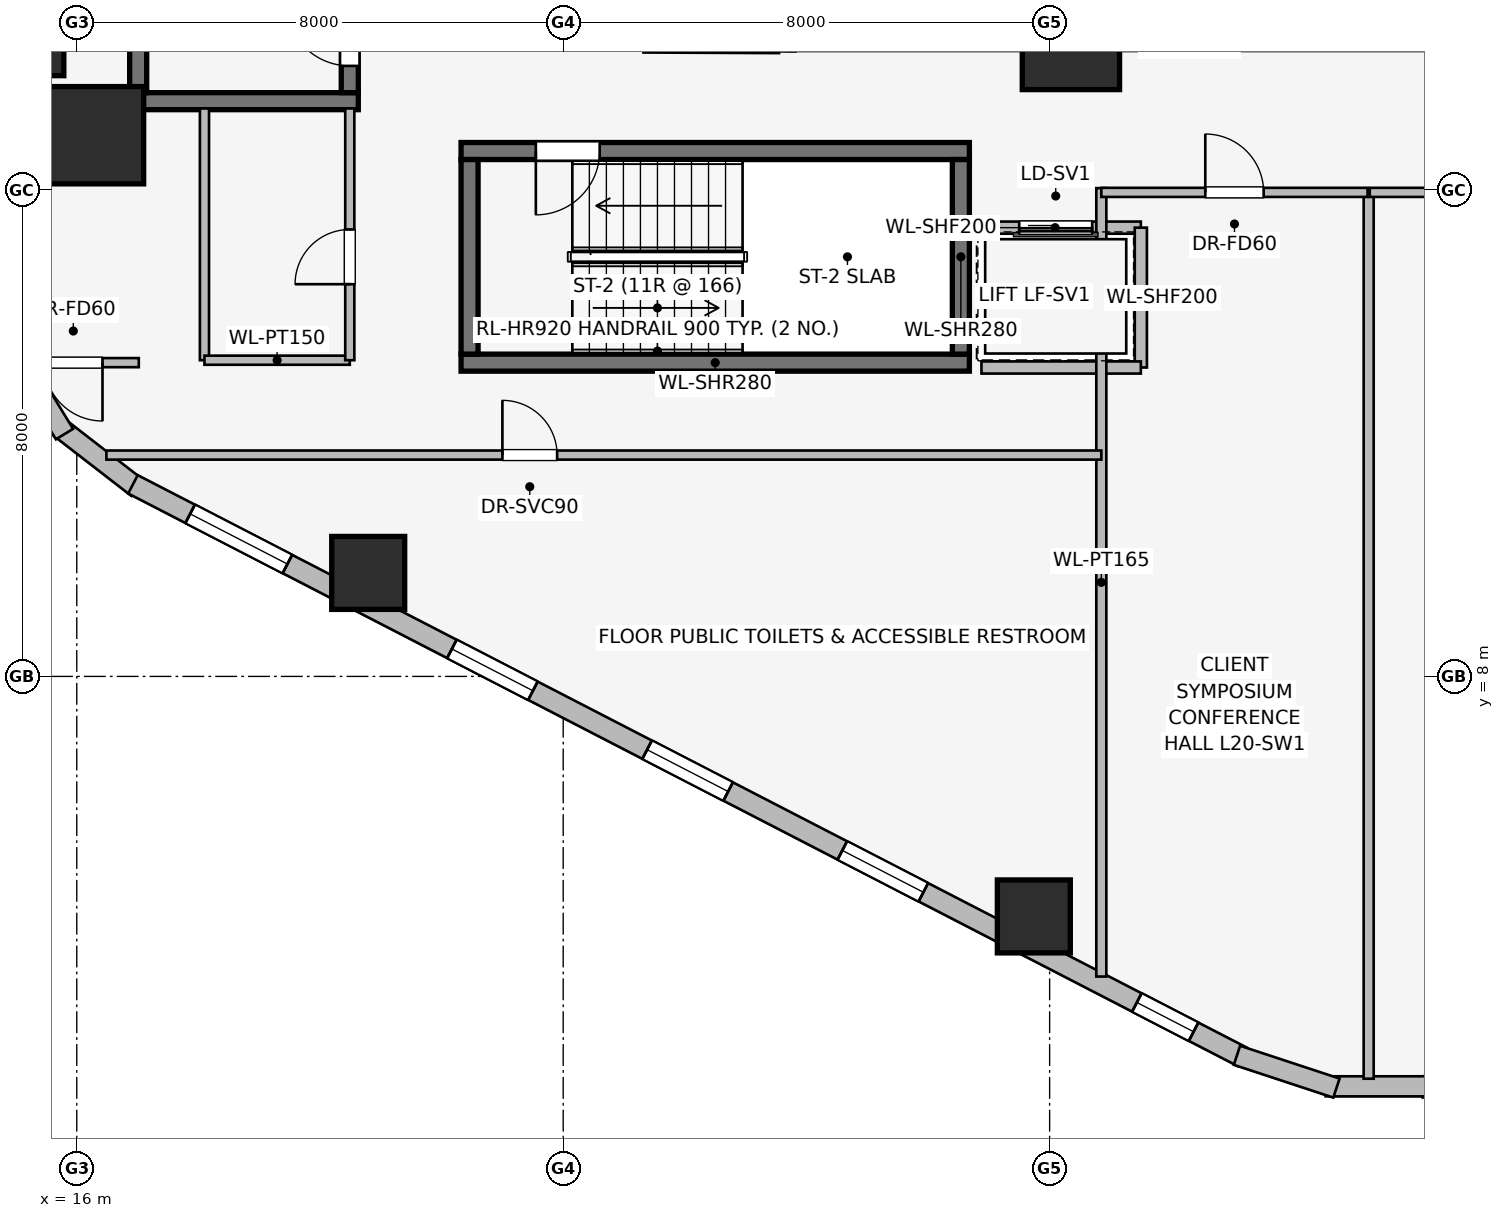
"""IFC4 building model, lengths in metres.
Left out: names, types, materials, properties, quantities, classifications, styles, units other than length and angle.
Written with IfcOpenShell. Run it as: python <this file> out.ifc"""

import sys

from ifc_helpers import new_model, si_unit, direction, frame, frame_2d, origin, origin_2d, place, context, subcontext, project, spatial, rectangle, extrude, element, fill, save


model = new_model("IFC4")
c1 = context("Model", 3, precision=1e-05, world=origin(), true_north=direction((0.0, 1.0)))
c2 = subcontext(c1, "Body", "Model", "MODEL_VIEW")
j1 = project(units=[si_unit("LENGTHUNIT", "METRE"), si_unit("PLANEANGLEUNIT", "RADIAN")], contexts=[c1])
p1 = place(None, origin())
s1 = spatial("IfcSite", under=j1, at=p1, CompositionType="ELEMENT")
p2 = place(p1, origin())
s2 = spatial("IfcBuilding", under=s1, at=p2, CompositionType="ELEMENT")
p3 = place(p2, frame((0.0, 0.0, 78.1)))
s3 = spatial("IfcBuildingStorey", under=s2, at=p3, CompositionType="ELEMENT", Elevation=78.1)
p4 = place(p3, frame((16.87, 17.46, 0.0), z_axis=(0.0, 0.0, 1.0), x_axis=(1.0, 0.0, 0.0)))
e1 = element("IfcWall", 1, at=p4, inside=s3, PredefinedType="SHEAR", context=c2, shape_type="SweptSolid", body=[
    extrude(rectangle(XDim=3.76, YDim=0.28, at=frame_2d((1.88, 0.0))), origin(), (0.0, 0.0, 1.0), 3.65),
])
p5 = place(p3, frame((17.01, 25.4, 0.0), z_axis=(0.0, 0.0, 1.0), x_axis=(0.0, -1.0, 0.0)))
e2 = element("IfcWall", 2, at=p5, inside=s3, PredefinedType="SHEAR", context=c2, shape_type="SweptSolid", body=[
    extrude(rectangle(XDim=7.8, YDim=0.28, at=frame_2d((3.9, 0.0))), origin(), (0.0, 0.0, 1.0), 3.65),
])
p6 = place(p3, frame((20.49, 17.6, 0.0), z_axis=(0.0, 0.0, 1.0), x_axis=(0.0, 1.0, 0.0)))
e3 = element("IfcWall", 3, at=p6, inside=s3, PredefinedType="SHEAR", context=c2, shape_type="SweptSolid", body=[
    extrude(rectangle(XDim=7.8, YDim=0.28, at=frame_2d((3.9, 0.0))), origin(), (0.0, 0.0, 1.0), 3.65),
])
p7 = place(p6, frame((0.44, 0.0, 0.0)))
e4 = element("IfcOpeningElement", 4, at=p7, cuts=e3, PredefinedType="OPENING", context=c2, shape_type="SweptSolid", body=[
    extrude(rectangle(XDim=1.05, YDim=2.0, at=frame_2d((0.525, 1.0))), frame((0.0, 0.15, 0.0), z_axis=(0.0, -1.0, 0.0), x_axis=(1.0, 0.0, 0.0)), (0.0, 0.0, 1.0), 0.3),
])
p8 = place(p3, frame((22.32, 13.16, 0.0), z_axis=(0.0, 0.0, 1.0), x_axis=(1.0, 0.0, 0.0)))
e5 = element("IfcWall", 5, at=p8, inside=s3, PredefinedType="SHEAR", context=c2, shape_type="SweptSolid", body=[
    extrude(rectangle(XDim=8.36, YDim=0.28, at=frame_2d((4.18, 0.0))), origin(), (0.0, 0.0, 1.0), 3.65),
])
p9 = place(p3, frame((30.68, 16.64, 0.0), z_axis=(0.0, 0.0, 1.0), x_axis=(-1.0, 0.0, 0.0)))
e6 = element("IfcWall", 6, at=p9, inside=s3, PredefinedType="SHEAR", context=c2, shape_type="SweptSolid", body=[
    extrude(rectangle(XDim=8.36, YDim=0.28, at=frame_2d((4.18, 0.0))), origin(), (0.0, 0.0, 1.0), 3.65),
])
p10 = place(p9, frame((6.08, 0.0, 0.0)))
e7 = element("IfcOpeningElement", 7, at=p10, cuts=e6, PredefinedType="OPENING", context=c2, shape_type="SweptSolid", body=[
    extrude(rectangle(XDim=1.05, YDim=2.0, at=frame_2d((0.525, 1.0))), frame((0.0, 0.15, 0.0), z_axis=(0.0, -1.0, 0.0), x_axis=(1.0, 0.0, 0.0)), (0.0, 0.0, 1.0), 0.3),
])
for number, where, z_axis, x_axis in (
    (8, (22.46, 16.5, 0.0), (0.0, 0.0, 1.0), (0.0, -1.0, 0.0)),
    (9, (30.54, 13.3, 0.0), (0.0, 0.0, 1.0), (0.0, 1.0, 0.0)),
):
    element("IfcWall", number, at=place(p3, frame(where, z_axis=z_axis, x_axis=x_axis)), inside=s3, PredefinedType="SHEAR", context=c2, shape_type="SweptSolid", body=[
        extrude(rectangle(XDim=3.2, YDim=0.28, at=frame_2d((1.6, 0.0))), origin(), (0.0, 0.0, 1.0), 3.65),
    ])
for number, where, z_axis, x_axis in (
    (10, (16.3, 16.9, 0.0), (0.0, 0.0, 1.0), (1.0, 0.0, 0.0)),
    (11, (32.35, 18.45, 0.0), (0.0, 0.0, 1.0), (1.0, 0.0, 0.0)),
):
    element("IfcColumn", number, at=place(p3, frame(where, z_axis=z_axis, x_axis=x_axis)), inside=s3, PredefinedType="COLUMN", context=c2, shape_type="SweptSolid", body=[
        extrude(rectangle(XDim=1.6, YDim=1.6, at=origin_2d()), origin(), (0.0, 0.0, 1.0), 3.65),
    ])
for number, where, z_axis, x_axis in (
    (12, (15.187, 18.479, 0.0), (0.0, 0.0, 1.0), (1.0, 0.0, 0.0)),
    (13, (20.793, 9.702, 0.0), (0.0, 0.0, 1.0), (1.0, 0.0, 0.0)),
    (14, (31.74, 4.053, 0.0), (0.0, 0.0, 1.0), (1.0, 0.0, 0.0)),
):
    element("IfcColumn", number, at=place(p3, frame(where, z_axis=z_axis, x_axis=x_axis)), inside=s3, PredefinedType="COLUMN", context=c2, shape_type="SweptSolid", body=[
        extrude(rectangle(XDim=1.2, YDim=1.2, at=origin_2d()), origin(), (0.0, 0.0, 1.0), 3.65),
    ])
p11 = place(p3, frame((16.998, 11.099, 0.0), z_axis=(0.0, 0.0, 1.0), x_axis=(-0.790691856293, 0.61221433207, 0.0)))
e15 = element("IfcWall", 15, at=p11, inside=s3, PredefinedType="STANDARD", context=c2, shape_type="SweptSolid", body=[
    extrude(rectangle(XDim=1.676, YDim=0.33, at=frame_2d((0.838, 0.0))), origin(), (0.0, 0.0, 1.0), 3.39),
])
p12 = place(p3, frame((15.798, 11.985, 0.0), z_axis=(0.0, 0.0, 1.0), x_axis=(-0.520584129191, 0.853810379671, 0.0)))
e16 = element("IfcWall", 16, at=p12, inside=s3, PredefinedType="STANDARD", context=c2, shape_type="SweptSolid", body=[
    extrude(rectangle(XDim=1.677, YDim=0.33, at=frame_2d((0.838, 0.0))), origin(), (0.0, 0.0, 1.0), 3.39),
])
p13 = place(p3, frame((35.169, 1.743, 0.0), z_axis=(0.0, 0.0, 1.0), x_axis=(-0.888634413993, 0.458616264721, 0.0)))
e17 = element("IfcWall", 17, at=p13, inside=s3, PredefinedType="STANDARD", context=c2, shape_type="SweptSolid", body=[
    extrude(rectangle(XDim=20.531, YDim=0.34, at=frame_2d((10.266, 0.0))), origin(), (0.0, 0.0, 1.0), 2.684),
])
p14 = place(p13, frame((0.902, 0.0, 0.75)))
e18 = element("IfcOpeningElement", 18, at=p14, cuts=e17, PredefinedType="OPENING", context=c2, shape_type="SweptSolid", body=[
    extrude(rectangle(XDim=1.05, YDim=1.4, at=frame_2d((0.525, 0.7))), frame((0.0, 0.18, 0.0), z_axis=(0.0, -1.0, 0.0), x_axis=(1.0, 0.0, 0.0)), (0.0, 0.0, 1.0), 0.36),
])
p15 = place(p13, frame((5.903, 0.0, 0.75)))
e19 = element("IfcOpeningElement", 19, at=p15, cuts=e17, PredefinedType="OPENING", context=c2, shape_type="SweptSolid", body=[
    extrude(rectangle(XDim=1.5, YDim=1.5, at=frame_2d((0.75, 0.75))), frame((0.0, 0.18, 0.0), z_axis=(0.0, -1.0, 0.0), x_axis=(1.0, 0.0, 0.0)), (0.0, 0.0, 1.0), 0.36),
])
p16 = place(p13, frame((9.516, 0.0, 0.75)))
e20 = element("IfcOpeningElement", 20, at=p16, cuts=e17, PredefinedType="OPENING", context=c2, shape_type="SweptSolid", body=[
    extrude(rectangle(XDim=1.5, YDim=1.5, at=frame_2d((0.75, 0.75))), frame((0.0, 0.18, 0.0), z_axis=(0.0, -1.0, 0.0), x_axis=(1.0, 0.0, 0.0)), (0.0, 0.0, 1.0), 0.36),
])
p17 = place(p13, frame((13.129, 0.0, 0.75)))
e21 = element("IfcOpeningElement", 21, at=p17, cuts=e17, PredefinedType="OPENING", context=c2, shape_type="SweptSolid", body=[
    extrude(rectangle(XDim=1.5, YDim=1.5, at=frame_2d((0.75, 0.75))), frame((0.0, 0.18, 0.0), z_axis=(0.0, -1.0, 0.0), x_axis=(1.0, 0.0, 0.0)), (0.0, 0.0, 1.0), 0.36),
])
p18 = place(p13, frame((17.673, 0.0, 0.75)))
e22 = element("IfcOpeningElement", 22, at=p18, cuts=e17, PredefinedType="OPENING", context=c2, shape_type="SweptSolid", body=[
    extrude(rectangle(XDim=1.8, YDim=1.5, at=frame_2d((0.9, 0.75))), frame((0.0, 0.18, 0.0), z_axis=(0.0, -1.0, 0.0), x_axis=(1.0, 0.0, 0.0)), (0.0, 0.0, 1.0), 0.36),
])
p19 = place(p3, frame((39.719, 1.769, 0.0), z_axis=(0.0, 0.0, 1.0), x_axis=(-0.94976901097, -0.312951794691, 0.0)))
e23 = element("IfcWall", 23, at=p19, inside=s3, PredefinedType="STANDARD", context=c2, shape_type="SweptSolid", body=[
    extrude(rectangle(XDim=1.722, YDim=0.33, at=frame_2d((0.861, 0.0))), origin(), (0.0, 0.0, 1.0), 3.39),
])
p20 = place(p3, frame((38.261, 1.259, 0.0), z_axis=(0.0, 0.0, 1.0), x_axis=(-1.0, 0.0, 0.0)))
e24 = element("IfcWall", 24, at=p20, inside=s3, PredefinedType="STANDARD", context=c2, shape_type="SweptSolid", body=[
    extrude(rectangle(XDim=1.722, YDim=0.33, at=frame_2d((0.861, 0.0))), origin(), (0.0, 0.0, 1.0), 3.39),
])
p21 = place(p3, frame((36.717, 1.23, 0.0), z_axis=(0.0, 0.0, 1.0), x_axis=(-0.94976901097, 0.312951794691, 0.0)))
e25 = element("IfcWall", 25, at=p21, inside=s3, PredefinedType="STANDARD", context=c2, shape_type="SweptSolid", body=[
    extrude(rectangle(XDim=1.722, YDim=0.33, at=frame_2d((0.861, 0.0))), origin(), (0.0, 0.0, 1.0), 3.39),
])
p22 = place(p3, frame((33.5, 15.38, 0.0), z_axis=(0.0, 0.0, 1.0), x_axis=(-1.0, 0.0, 0.0)))
e26 = element("IfcWall", 26, at=p22, inside=s3, PredefinedType="PARTITIONING", context=c2, shape_type="SweptSolid", body=[
    extrude(rectangle(XDim=2.82, YDim=0.2, at=frame_2d((1.41, 0.0))), origin(), (0.0, 0.0, 1.0), 3.39),
])
p23 = place(p22, frame((0.8, 0.0, 0.0)))
e27 = element("IfcOpeningElement", 27, at=p23, cuts=e26, PredefinedType="OPENING", context=c2, shape_type="SweptSolid", body=[
    extrude(rectangle(XDim=1.2, YDim=2.2, at=frame_2d((0.6, 1.1))), frame((0.0, 0.11, 0.0), z_axis=(0.0, -1.0, 0.0), x_axis=(1.0, 0.0, 0.0)), (0.0, 0.0, 1.0), 0.22),
])
p24 = place(p3, frame((33.5, 13.08, 0.0), z_axis=(0.0, 0.0, 1.0), x_axis=(0.0, 1.0, 0.0)))
e28 = element("IfcWall", 28, at=p24, inside=s3, PredefinedType="PARTITIONING", context=c2, shape_type="SweptSolid", body=[
    extrude(rectangle(XDim=2.3, YDim=0.2, at=frame_2d((1.15, 0.0))), origin(), (0.0, 0.0, 1.0), 3.39),
])
p25 = place(p3, frame((30.879, 13.08, 0.0), z_axis=(0.0, 0.0, 1.0), x_axis=(1.0, 0.0, 0.0)))
e29 = element("IfcWall", 29, at=p25, inside=s3, PredefinedType="PARTITIONING", context=c2, shape_type="SweptSolid", body=[
    extrude(rectangle(XDim=2.621, YDim=0.2, at=frame_2d((1.311, 0.0))), origin(), (0.0, 0.0, 1.0), 3.39),
])
p26 = place(p3, frame((25.32, 18.36, 0.0), z_axis=(0.0, 0.0, 1.0), x_axis=(0.999989925833, -0.004488678231, 0.0)))
e30 = element("IfcWall", 30, at=p26, inside=s3, PredefinedType="PARTITIONING", context=c2, shape_type="SweptSolid", body=[
    extrude(rectangle(XDim=2.23, YDim=0.2, at=frame_2d((1.115, 0.0))), origin(), (0.0, 0.0, 1.0), 3.39),
])
p27 = place(p3, frame((18.1, 17.34, 0.0), z_axis=(0.0, 0.0, 1.0), x_axis=(0.0, -1.0, 0.0)))
e31 = element("IfcWall", 31, at=p27, inside=s3, PredefinedType="PARTITIONING", context=c2, shape_type="SweptSolid", body=[
    extrude(rectangle(XDim=4.14, YDim=0.15, at=frame_2d((2.07, 0.0))), origin(), (0.0, 0.0, 1.0), 3.39),
])
p28 = place(p3, frame((18.1, 13.2, 0.0), z_axis=(0.0, 0.0, 1.0), x_axis=(1.0, 0.0, 0.0)))
e32 = element("IfcWall", 32, at=p28, inside=s3, PredefinedType="PARTITIONING", context=c2, shape_type="SweptSolid", body=[
    extrude(rectangle(XDim=2.39, YDim=0.15, at=frame_2d((1.195, 0.0))), origin(), (0.0, 0.0, 1.0), 3.39),
])
p29 = place(p3, frame((20.49, 13.2, 0.0), z_axis=(0.0, 0.0, 1.0), x_axis=(0.0, 1.0, 0.0)))
e33 = element("IfcWall", 33, at=p29, inside=s3, PredefinedType="PARTITIONING", context=c2, shape_type="SweptSolid", body=[
    extrude(rectangle(XDim=4.14, YDim=0.15, at=frame_2d((2.07, 0.0))), origin(), (0.0, 0.0, 1.0), 3.39),
])
p30 = place(p29, frame((1.25, 0.0, 0.0)))
e34 = element("IfcOpeningElement", 34, at=p30, cuts=e33, PredefinedType="OPENING", context=c2, shape_type="SweptSolid", body=[
    extrude(rectangle(XDim=0.9, YDim=2.0, at=frame_2d((0.45, 1.0))), frame((0.0, 0.085, 0.0), z_axis=(0.0, -1.0, 0.0), x_axis=(1.0, 0.0, 0.0)), (0.0, 0.0, 1.0), 0.17),
])
p31 = place(p3, frame((32.85, 3.064, 0.0), z_axis=(0.0, 0.0, 1.0), x_axis=(0.0, 1.0, 0.0)))
e35 = element("IfcWall", 35, at=p31, inside=s3, PredefinedType="PARTITIONING", context=c2, shape_type="SweptSolid", body=[
    extrude(rectangle(XDim=12.966, YDim=0.165, at=frame_2d((6.483, 0.0))), origin(), (0.0, 0.0, 1.0), 3.39),
])
p32 = place(p3, frame((16.487, 11.64, 0.0), z_axis=(0.0, 0.0, 1.0), x_axis=(1.0, 0.0, 0.0)))
e36 = element("IfcWall", 36, at=p32, inside=s3, PredefinedType="PARTITIONING", context=c2, shape_type="SweptSolid", body=[
    extrude(rectangle(XDim=16.363, YDim=0.15, at=frame_2d((8.182, 0.0))), origin(), (0.0, 0.0, 1.0), 3.39),
])
p33 = place(p32, frame((6.513, 0.0, 0.0)))
e37 = element("IfcOpeningElement", 37, at=p33, cuts=e36, PredefinedType="OPENING", context=c2, shape_type="SweptSolid", body=[
    extrude(rectangle(XDim=0.9, YDim=2.0, at=frame_2d((0.45, 1.0))), frame((0.0, 0.085, 0.0), z_axis=(0.0, -1.0, 0.0), x_axis=(1.0, 0.0, 0.0)), (0.0, 0.0, 1.0), 0.17),
])
p34 = place(p3, frame((17.02, 13.16, 0.0), z_axis=(0.0, 0.0, 1.0), x_axis=(-1.0, 0.0, 0.0)))
e38 = element("IfcWall", 38, at=p34, inside=s3, PredefinedType="PARTITIONING", context=c2, shape_type="SweptSolid", body=[
    extrude(rectangle(XDim=2.12, YDim=0.15, at=frame_2d((1.06, 0.0))), origin(), (0.0, 0.0, 1.0), 3.39),
])
p35 = place(p34, frame((0.597, 0.0, 0.0)))
e39 = element("IfcOpeningElement", 39, at=p35, cuts=e38, PredefinedType="OPENING", context=c2, shape_type="SweptSolid", body=[
    extrude(rectangle(XDim=0.96, YDim=2.0, at=frame_2d((0.48, 1.0))), frame((0.0, 0.085, 0.0), z_axis=(0.0, -1.0, 0.0), x_axis=(1.0, 0.0, 0.0)), (0.0, 0.0, 1.0), 0.17),
])
p36 = place(p3, frame((37.247, 1.384, 0.0), z_axis=(0.0, 0.0, 1.0), x_axis=(0.0, 1.0, 0.0)))
e40 = element("IfcWall", 40, at=p36, inside=s3, PredefinedType="PARTITIONING", context=c2, shape_type="SweptSolid", body=[
    extrude(rectangle(XDim=14.546, YDim=0.165, at=frame_2d((7.273, 0.0))), origin(), (0.0, 0.0, 1.0), 3.39),
])
p37 = place(p3, frame((32.85, 15.96, 0.0), z_axis=(0.0, 0.0, 1.0), x_axis=(1.0, 0.0, 0.0)))
e41 = element("IfcWall", 41, at=p37, inside=s3, PredefinedType="PARTITIONING", context=c2, shape_type="SweptSolid", body=[
    extrude(rectangle(XDim=4.379, YDim=0.15, at=frame_2d((2.189, 0.0))), origin(), (0.0, 0.0, 1.0), 3.39),
])
p38 = place(p37, frame((1.71, 0.0, 0.0)))
e42 = element("IfcOpeningElement", 42, at=p38, cuts=e41, PredefinedType="OPENING", context=c2, shape_type="SweptSolid", body=[
    extrude(rectangle(XDim=0.96, YDim=2.0, at=frame_2d((0.48, 1.0))), frame((0.0, 0.085, 0.0), z_axis=(0.0, -1.0, 0.0), x_axis=(1.0, 0.0, 0.0)), (0.0, 0.0, 1.0), 0.17),
])
p39 = place(p3, frame((37.265, 15.96, 0.0), z_axis=(0.0, 0.0, 1.0), x_axis=(1.0, 0.0, 0.0)))
e43 = element("IfcWall", 43, at=p39, inside=s3, PredefinedType="PARTITIONING", context=c2, shape_type="SweptSolid", body=[
    extrude(rectangle(XDim=4.561, YDim=0.15, at=frame_2d((2.281, 0.0))), origin(), (0.0, 0.0, 1.0), 3.39),
])
p40 = place(p39, frame((1.801, 0.0, 0.0)))
e44 = element("IfcOpeningElement", 44, at=p40, cuts=e43, PredefinedType="OPENING", context=c2, shape_type="SweptSolid", body=[
    extrude(rectangle(XDim=0.96, YDim=2.0, at=frame_2d((0.48, 1.0))), frame((0.0, 0.085, 0.0), z_axis=(0.0, -1.0, 0.0), x_axis=(1.0, 0.0, 0.0)), (0.0, 0.0, 1.0), 0.17),
])
p41 = place(p14, origin())
e45 = element("IfcWindow", 45, at=p41, inside=s3, PartitioningType="SINGLE_PANEL", PredefinedType="WINDOW", context=c2, shape_type="SweptSolid", body=[
    extrude(rectangle(XDim=1.05, YDim=1.4, at=frame_2d((0.525, 0.7))), frame((0.0, 0.03, 0.0), z_axis=(0.0, -1.0, 0.0), x_axis=(1.0, 0.0, 0.0)), (0.0, 0.0, 1.0), 0.06),
])
fill(e18, e45)
p42 = place(p15, origin())
e46 = element("IfcWindow", 46, at=p42, inside=s3, PartitioningType="SINGLE_PANEL", PredefinedType="WINDOW", context=c2, shape_type="SweptSolid", body=[
    extrude(rectangle(XDim=1.5, YDim=1.5, at=frame_2d((0.75, 0.75))), frame((0.0, 0.03, 0.0), z_axis=(0.0, -1.0, 0.0), x_axis=(1.0, 0.0, 0.0)), (0.0, 0.0, 1.0), 0.06),
])
fill(e19, e46)
p43 = place(p16, origin())
e47 = element("IfcWindow", 47, at=p43, inside=s3, PartitioningType="SINGLE_PANEL", PredefinedType="WINDOW", context=c2, shape_type="SweptSolid", body=[
    extrude(rectangle(XDim=1.5, YDim=1.5, at=frame_2d((0.75, 0.75))), frame((0.0, 0.03, 0.0), z_axis=(0.0, -1.0, 0.0), x_axis=(1.0, 0.0, 0.0)), (0.0, 0.0, 1.0), 0.06),
])
fill(e20, e47)
p44 = place(p17, origin())
e48 = element("IfcWindow", 48, at=p44, inside=s3, PartitioningType="SINGLE_PANEL", PredefinedType="WINDOW", context=c2, shape_type="SweptSolid", body=[
    extrude(rectangle(XDim=1.5, YDim=1.5, at=frame_2d((0.75, 0.75))), frame((0.0, 0.03, 0.0), z_axis=(0.0, -1.0, 0.0), x_axis=(1.0, 0.0, 0.0)), (0.0, 0.0, 1.0), 0.06),
])
fill(e21, e48)
p45 = place(p18, origin())
e49 = element("IfcWindow", 49, at=p45, inside=s3, PartitioningType="SINGLE_PANEL", PredefinedType="WINDOW", context=c2, shape_type="SweptSolid", body=[
    extrude(rectangle(XDim=1.8, YDim=1.5, at=frame_2d((0.9, 0.75))), frame((0.0, 0.03, 0.0), z_axis=(0.0, -1.0, 0.0), x_axis=(1.0, 0.0, 0.0)), (0.0, 0.0, 1.0), 0.06),
])
fill(e22, e49)
p46 = place(p7, origin())
e50 = element("IfcDoor", 50, at=p46, inside=s3, OperationType="SINGLE_SWING_RIGHT", PredefinedType="DOOR", context=c2, shape_type="SweptSolid", body=[
    extrude(rectangle(XDim=1.05, YDim=2.0, at=frame_2d((0.525, 1.0))), frame((0.0, 0.025, 0.0), z_axis=(0.0, -1.0, 0.0), x_axis=(1.0, 0.0, 0.0)), (0.0, 0.0, 1.0), 0.05),
])
fill(e4, e50)
p47 = place(p10, origin())
e51 = element("IfcDoor", 51, at=p47, inside=s3, OperationType="SINGLE_SWING_RIGHT", PredefinedType="DOOR", context=c2, shape_type="SweptSolid", body=[
    extrude(rectangle(XDim=1.05, YDim=2.0, at=frame_2d((0.525, 1.0))), frame((0.0, 0.025, 0.0), z_axis=(0.0, -1.0, 0.0), x_axis=(1.0, 0.0, 0.0)), (0.0, 0.0, 1.0), 0.05),
])
fill(e7, e51)
p48 = place(p23, origin())
e52 = element("IfcDoor", 52, at=p48, inside=s3, OperationType="SLIDING_TO_RIGHT", PredefinedType="DOOR", context=c2, shape_type="SweptSolid", body=[
    extrude(rectangle(XDim=1.2, YDim=2.2, at=frame_2d((0.6, 1.1))), frame((0.0, 0.025, 0.0), z_axis=(0.0, -1.0, 0.0), x_axis=(1.0, 0.0, 0.0)), (0.0, 0.0, 1.0), 0.05),
])
fill(e27, e52)
p49 = place(p30, origin())
e53 = element("IfcDoor", 53, at=p49, inside=s3, OperationType="SINGLE_SWING_LEFT", PredefinedType="DOOR", context=c2, shape_type="SweptSolid", body=[
    extrude(rectangle(XDim=0.9, YDim=2.0, at=frame_2d((0.45, 1.0))), frame((0.0, 0.025, 0.0), z_axis=(0.0, -1.0, 0.0), x_axis=(1.0, 0.0, 0.0)), (0.0, 0.0, 1.0), 0.05),
])
fill(e34, e53)
p50 = place(p33, origin())
e54 = element("IfcDoor", 54, at=p50, inside=s3, OperationType="SINGLE_SWING_LEFT", PredefinedType="DOOR", context=c2, shape_type="SweptSolid", body=[
    extrude(rectangle(XDim=0.9, YDim=2.0, at=frame_2d((0.45, 1.0))), frame((0.0, 0.025, 0.0), z_axis=(0.0, -1.0, 0.0), x_axis=(1.0, 0.0, 0.0)), (0.0, 0.0, 1.0), 0.05),
])
fill(e37, e54)
p51 = place(p35, origin())
e55 = element("IfcDoor", 55, at=p51, inside=s3, OperationType="SINGLE_SWING_LEFT", PredefinedType="DOOR", context=c2, shape_type="SweptSolid", body=[
    extrude(rectangle(XDim=0.96, YDim=2.0, at=frame_2d((0.48, 1.0))), frame((0.0, 0.025, 0.0), z_axis=(0.0, -1.0, 0.0), x_axis=(1.0, 0.0, 0.0)), (0.0, 0.0, 1.0), 0.05),
])
fill(e39, e55)
p52 = place(p38, origin())
e56 = element("IfcDoor", 56, at=p52, inside=s3, OperationType="SINGLE_SWING_LEFT", PredefinedType="DOOR", context=c2, shape_type="SweptSolid", body=[
    extrude(rectangle(XDim=0.96, YDim=2.0, at=frame_2d((0.48, 1.0))), frame((0.0, 0.025, 0.0), z_axis=(0.0, -1.0, 0.0), x_axis=(1.0, 0.0, 0.0)), (0.0, 0.0, 1.0), 0.05),
])
fill(e42, e56)
save(model, sys.argv[1])
